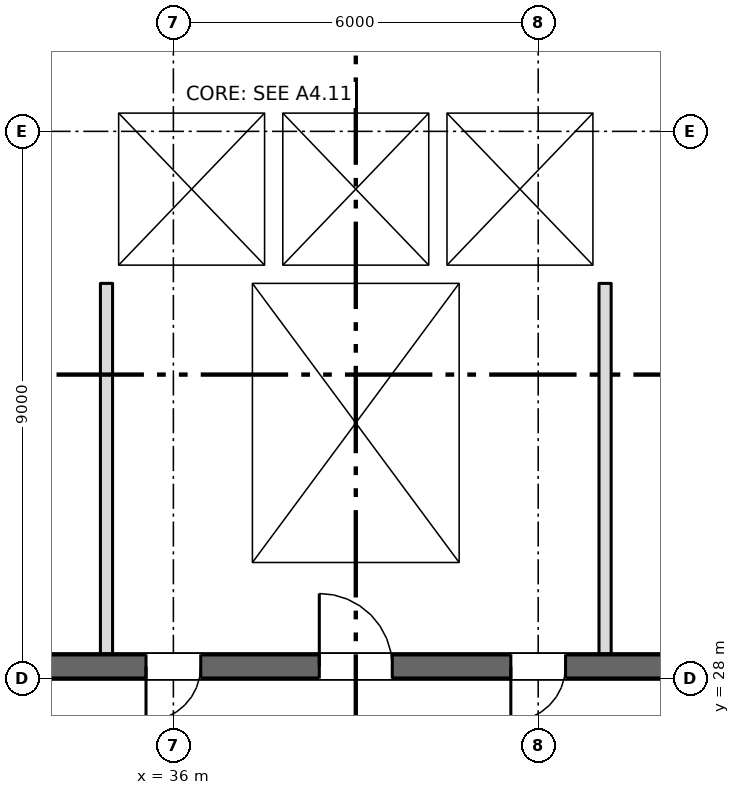
"""IFC4 building model, lengths in metres.
Left out: names, types, materials, properties, quantities, classifications, styles, units other than length and angle.
Written with IfcOpenShell. Run it as: python <this file> out.ifc"""

import sys

from ifc_helpers import new_model, si_unit, direction, frame, frame_2d, origin, place, context, subcontext, project, spatial, rectangle, extrude, element, fill, save


model = new_model("IFC4")
c1 = context("Model", 3, precision=1e-05, world=origin(), true_north=direction((0.0, 1.0)))
c2 = subcontext(c1, "Body", "Model", "MODEL_VIEW")
j1 = project(units=[si_unit("LENGTHUNIT", "METRE"), si_unit("PLANEANGLEUNIT", "RADIAN")], contexts=[c1])
p1 = place(None, origin())
s1 = spatial("IfcSite", under=j1, at=p1, CompositionType="ELEMENT")
p2 = place(p1, origin())
s2 = spatial("IfcBuilding", under=s1, at=p2, CompositionType="ELEMENT")
p3 = place(p2, frame((0.0, 0.0, 67.5)))
s3 = spatial("IfcBuildingStorey", under=s2, at=p3, CompositionType="ELEMENT", Elevation=67.5)
p4 = place(p3, frame((6.7, 28.2, 0.0), z_axis=(0.0, 0.0, 1.0), x_axis=(1.0, 0.0, 0.0)))
e1 = element("IfcWall", 1, at=p4, inside=s3, PredefinedType="SHEAR", context=c2, shape_type="SweptSolid", body=[
    extrude(rectangle(XDim=57.8, YDim=0.4, at=frame_2d((28.9, 0.0))), origin(), (0.0, 0.0, 1.0), 3.35),
])
p5 = place(p4, frame((12.562, 0.0, 0.0)))
e2 = element("IfcOpeningElement", 2, at=p5, cuts=e1, PredefinedType="OPENING", context=c2, shape_type="SweptSolid", body=[
    extrude(rectangle(XDim=0.9, YDim=2.1, at=frame_2d((0.45, 1.05))), frame((0.0, 0.21, 0.0), z_axis=(0.0, -1.0, 0.0), x_axis=(1.0, 0.0, 0.0)), (0.0, 0.0, 1.0), 0.42),
])
p6 = place(p4, frame((15.137, 0.0, 0.0)))
e3 = element("IfcOpeningElement", 3, at=p6, cuts=e1, PredefinedType="OPENING", context=c2, shape_type="SweptSolid", body=[
    extrude(rectangle(XDim=0.9, YDim=2.1, at=frame_2d((0.45, 1.05))), frame((0.0, 0.21, 0.0), z_axis=(0.0, -1.0, 0.0), x_axis=(1.0, 0.0, 0.0)), (0.0, 0.0, 1.0), 0.42),
])
p7 = place(p4, frame((49.85, 0.0, 0.0)))
e4 = element("IfcOpeningElement", 4, at=p7, cuts=e1, PredefinedType="OPENING", context=c2, shape_type="SweptSolid", body=[
    extrude(rectangle(XDim=0.9, YDim=2.1, at=frame_2d((0.45, 1.05))), frame((0.0, 0.21, 0.0), z_axis=(0.0, -1.0, 0.0), x_axis=(1.0, 0.0, 0.0)), (0.0, 0.0, 1.0), 0.42),
])
p8 = place(p4, frame((0.562, 0.0, 0.0)))
e5 = element("IfcOpeningElement", 5, at=p8, cuts=e1, PredefinedType="OPENING", context=c2, shape_type="SweptSolid", body=[
    extrude(rectangle(XDim=0.9, YDim=2.1, at=frame_2d((0.45, 1.05))), frame((0.0, 0.21, 0.0), z_axis=(0.0, -1.0, 0.0), x_axis=(1.0, 0.0, 0.0)), (0.0, 0.0, 1.0), 0.42),
])
p9 = place(p4, frame((2.137, 0.0, 0.0)))
e6 = element("IfcOpeningElement", 6, at=p9, cuts=e1, PredefinedType="OPENING", context=c2, shape_type="SweptSolid", body=[
    extrude(rectangle(XDim=0.9, YDim=2.1, at=frame_2d((0.45, 1.05))), frame((0.0, 0.21, 0.0), z_axis=(0.0, -1.0, 0.0), x_axis=(1.0, 0.0, 0.0)), (0.0, 0.0, 1.0), 0.42),
])
p10 = place(p4, frame((4.7, 0.0, 0.0)))
e7 = element("IfcOpeningElement", 7, at=p10, cuts=e1, PredefinedType="OPENING", context=c2, shape_type="SweptSolid", body=[
    extrude(rectangle(XDim=1.2, YDim=2.1, at=frame_2d((0.6, 1.05))), frame((0.0, 0.21, 0.0), z_axis=(0.0, -1.0, 0.0), x_axis=(1.0, 0.0, 0.0)), (0.0, 0.0, 1.0), 0.42),
])
p11 = place(p4, frame((31.7, 0.0, 0.0)))
e8 = element("IfcOpeningElement", 8, at=p11, cuts=e1, PredefinedType="OPENING", context=c2, shape_type="SweptSolid", body=[
    extrude(rectangle(XDim=1.2, YDim=2.1, at=frame_2d((0.6, 1.05))), frame((0.0, 0.21, 0.0), z_axis=(0.0, -1.0, 0.0), x_axis=(1.0, 0.0, 0.0)), (0.0, 0.0, 1.0), 0.42),
])
p12 = place(p4, frame((55.2, 0.0, 0.0)))
e9 = element("IfcOpeningElement", 9, at=p12, cuts=e1, PredefinedType="OPENING", context=c2, shape_type="SweptSolid", body=[
    extrude(rectangle(XDim=1.2, YDim=2.1, at=frame_2d((0.6, 1.05))), frame((0.0, 0.21, 0.0), z_axis=(0.0, -1.0, 0.0), x_axis=(1.0, 0.0, 0.0)), (0.0, 0.0, 1.0), 0.42),
])
p13 = place(p4, frame((21.7, 0.0, 0.0)))
e10 = element("IfcOpeningElement", 10, at=p13, cuts=e1, PredefinedType="OPENING", context=c2, shape_type="SweptSolid", body=[
    extrude(rectangle(XDim=1.2, YDim=2.1, at=frame_2d((0.6, 1.05))), frame((0.0, 0.21, 0.0), z_axis=(0.0, -1.0, 0.0), x_axis=(1.0, 0.0, 0.0)), (0.0, 0.0, 1.0), 0.42),
])
p14 = place(p4, frame((41.7, 0.0, 0.0)))
e11 = element("IfcOpeningElement", 11, at=p14, cuts=e1, PredefinedType="OPENING", context=c2, shape_type="SweptSolid", body=[
    extrude(rectangle(XDim=1.2, YDim=2.1, at=frame_2d((0.6, 1.05))), frame((0.0, 0.21, 0.0), z_axis=(0.0, -1.0, 0.0), x_axis=(1.0, 0.0, 0.0)), (0.0, 0.0, 1.0), 0.42),
])
p15 = place(p4, frame((24.85, 0.0, 0.0)))
e12 = element("IfcOpeningElement", 12, at=p15, cuts=e1, PredefinedType="OPENING", context=c2, shape_type="SweptSolid", body=[
    extrude(rectangle(XDim=2.4, YDim=2.1, at=frame_2d((1.2, 1.05))), frame((0.0, 0.21, 0.0), z_axis=(0.0, -1.0, 0.0), x_axis=(1.0, 0.0, 0.0)), (0.0, 0.0, 1.0), 0.42),
])
p16 = place(p4, frame((37.35, 0.0, 0.0)))
e13 = element("IfcOpeningElement", 13, at=p16, cuts=e1, PredefinedType="OPENING", context=c2, shape_type="SweptSolid", body=[
    extrude(rectangle(XDim=2.4, YDim=2.1, at=frame_2d((1.2, 1.05))), frame((0.0, 0.21, 0.0), z_axis=(0.0, -1.0, 0.0), x_axis=(1.0, 0.0, 0.0)), (0.0, 0.0, 1.0), 0.42),
])
p17 = place(p4, frame((7.85, 0.0, 0.0)))
e14 = element("IfcOpeningElement", 14, at=p17, cuts=e1, PredefinedType="OPENING", context=c2, shape_type="SweptSolid", body=[
    extrude(rectangle(XDim=2.4, YDim=2.1, at=frame_2d((1.2, 1.05))), frame((0.0, 0.21, 0.0), z_axis=(0.0, -1.0, 0.0), x_axis=(1.0, 0.0, 0.0)), (0.0, 0.0, 1.0), 0.42),
])
p18 = place(p4, frame((28.85, 0.0, 0.0)))
e15 = element("IfcOpeningElement", 15, at=p18, cuts=e1, PredefinedType="OPENING", context=c2, shape_type="SweptSolid", body=[
    extrude(rectangle(XDim=0.9, YDim=2.1, at=frame_2d((0.45, 1.05))), frame((0.0, 0.21, 0.0), z_axis=(0.0, -1.0, 0.0), x_axis=(1.0, 0.0, 0.0)), (0.0, 0.0, 1.0), 0.42),
])
p19 = place(p4, frame((34.85, 0.0, 0.0)))
e16 = element("IfcOpeningElement", 16, at=p19, cuts=e1, PredefinedType="OPENING", context=c2, shape_type="SweptSolid", body=[
    extrude(rectangle(XDim=0.9, YDim=2.1, at=frame_2d((0.45, 1.05))), frame((0.0, 0.21, 0.0), z_axis=(0.0, -1.0, 0.0), x_axis=(1.0, 0.0, 0.0)), (0.0, 0.0, 1.0), 0.42),
])
for number, where, z_axis, x_axis in (
    (17, (37.15, 28.4, 0.0), (0.0, 0.0, 1.0), (0.0, 1.0, 0.0)),
    (18, (40.85, 28.4, 0.0), (0.0, 0.0, 1.0), (0.0, 1.0, 0.0)),
):
    element("IfcWall", number, at=place(p3, frame(where, z_axis=z_axis, x_axis=x_axis)), inside=s3, PredefinedType="SHEAR", context=c2, shape_type="SweptSolid", body=[
        extrude(rectangle(XDim=6.1, YDim=0.3, at=frame_2d((3.05, 0.0))), origin(), (0.0, 0.0, 1.0), 3.35),
    ])
p20 = place(p3, frame((34.8, 34.65, 0.0), z_axis=(0.0, 0.0, 1.0), x_axis=(1.0, 0.0, 0.0)))
e19 = element("IfcWall", 19, at=p20, inside=s3, PredefinedType="SHEAR", context=c2, shape_type="SweptSolid", body=[
    extrude(rectangle(XDim=8.4, YDim=0.3, at=frame_2d((4.2, 0.0))), origin(), (0.0, 0.0, 1.0), 3.35),
])
p21 = place(p3, frame((34.8, 37.45, 0.0), z_axis=(0.0, 0.0, 1.0), x_axis=(1.0, 0.0, 0.0)))
e20 = element("IfcWall", 20, at=p21, inside=s3, PredefinedType="SHEAR", context=c2, shape_type="SweptSolid", body=[
    extrude(rectangle(XDim=8.4, YDim=0.3, at=frame_2d((4.2, 0.0))), origin(), (0.0, 0.0, 1.0), 3.35),
])
p22 = place(p21, frame((0.95, 0.0, 0.0)))
e21 = element("IfcOpeningElement", 21, at=p22, cuts=e20, PredefinedType="OPENING", context=c2, shape_type="SweptSolid", body=[
    extrude(rectangle(XDim=1.1, YDim=2.1, at=frame_2d((0.55, 1.05))), frame((0.0, 0.16, 0.0), z_axis=(0.0, -1.0, 0.0), x_axis=(1.0, 0.0, 0.0)), (0.0, 0.0, 1.0), 0.32),
])
p23 = place(p21, frame((3.65, 0.0, 0.0)))
e22 = element("IfcOpeningElement", 22, at=p23, cuts=e20, PredefinedType="OPENING", context=c2, shape_type="SweptSolid", body=[
    extrude(rectangle(XDim=1.1, YDim=2.1, at=frame_2d((0.55, 1.05))), frame((0.0, 0.16, 0.0), z_axis=(0.0, -1.0, 0.0), x_axis=(1.0, 0.0, 0.0)), (0.0, 0.0, 1.0), 0.32),
])
p24 = place(p21, frame((6.35, 0.0, 0.0)))
e23 = element("IfcOpeningElement", 23, at=p24, cuts=e20, PredefinedType="OPENING", context=c2, shape_type="SweptSolid", body=[
    extrude(rectangle(XDim=1.1, YDim=2.1, at=frame_2d((0.55, 1.05))), frame((0.0, 0.16, 0.0), z_axis=(0.0, -1.0, 0.0), x_axis=(1.0, 0.0, 0.0)), (0.0, 0.0, 1.0), 0.32),
])
for number, where, z_axis, x_axis in (
    (24, (34.95, 34.8, 0.0), (0.0, 0.0, 1.0), (0.0, 1.0, 0.0)),
    (25, (43.05, 34.8, 0.0), (0.0, 0.0, 1.0), (0.0, 1.0, 0.0)),
    (26, (37.65, 34.8, 0.0), (0.0, 0.0, 1.0), (0.0, 1.0, 0.0)),
    (27, (40.35, 34.8, 0.0), (0.0, 0.0, 1.0), (0.0, 1.0, 0.0)),
):
    element("IfcWall", number, at=place(p3, frame(where, z_axis=z_axis, x_axis=x_axis)), inside=s3, PredefinedType="SHEAR", context=c2, shape_type="SweptSolid", body=[
        extrude(rectangle(XDim=2.5, YDim=0.3, at=frame_2d((1.25, 0.0))), origin(), (0.0, 0.0, 1.0), 3.35),
    ])
for number, where, z_axis, x_axis in (
    (28, (34.9, 28.4, 0.0), (0.0, 0.0, 1.0), (0.0, 1.0, 0.0)),
    (29, (43.1, 28.4, 0.0), (0.0, 0.0, 1.0), (0.0, 1.0, 0.0)),
):
    element("IfcWall", number, at=place(p3, frame(where, z_axis=z_axis, x_axis=x_axis)), inside=s3, PredefinedType="PARTITIONING", context=c2, shape_type="SweptSolid", body=[
        extrude(rectangle(XDim=6.1, YDim=0.2, at=frame_2d((3.05, 0.0))), origin(), (0.0, 0.0, 1.0), 3.35),
    ])
p25 = place(p22, origin())
e30 = element("IfcDoor", 30, at=p25, inside=s3, OperationType="SLIDING_TO_LEFT", PredefinedType="DOOR", context=c2, shape_type="SweptSolid", body=[
    extrude(rectangle(XDim=1.1, YDim=2.1, at=frame_2d((0.55, 1.05))), frame((0.0, 0.025, 0.0), z_axis=(0.0, -1.0, 0.0), x_axis=(1.0, 0.0, 0.0)), (0.0, 0.0, 1.0), 0.05),
])
fill(e21, e30)
p26 = place(p23, origin())
e31 = element("IfcDoor", 31, at=p26, inside=s3, OperationType="SLIDING_TO_LEFT", PredefinedType="DOOR", context=c2, shape_type="SweptSolid", body=[
    extrude(rectangle(XDim=1.1, YDim=2.1, at=frame_2d((0.55, 1.05))), frame((0.0, 0.025, 0.0), z_axis=(0.0, -1.0, 0.0), x_axis=(1.0, 0.0, 0.0)), (0.0, 0.0, 1.0), 0.05),
])
fill(e22, e31)
p27 = place(p24, origin())
e32 = element("IfcDoor", 32, at=p27, inside=s3, OperationType="SLIDING_TO_LEFT", PredefinedType="DOOR", context=c2, shape_type="SweptSolid", body=[
    extrude(rectangle(XDim=1.1, YDim=2.1, at=frame_2d((0.55, 1.05))), frame((0.0, 0.025, 0.0), z_axis=(0.0, -1.0, 0.0), x_axis=(1.0, 0.0, 0.0)), (0.0, 0.0, 1.0), 0.05),
])
fill(e23, e32)
p28 = place(p11, origin())
e33 = element("IfcDoor", 33, at=p28, inside=s3, OperationType="SINGLE_SWING_LEFT", PredefinedType="DOOR", context=c2, shape_type="SweptSolid", body=[
    extrude(rectangle(XDim=1.2, YDim=2.1, at=frame_2d((0.6, 1.05))), frame((0.0, 0.025, 0.0), z_axis=(0.0, -1.0, 0.0), x_axis=(1.0, 0.0, 0.0)), (0.0, 0.0, 1.0), 0.05),
])
fill(e8, e33)
p29 = place(p18, origin())
e34 = element("IfcDoor", 34, at=p29, inside=s3, OperationType="SINGLE_SWING_LEFT", PredefinedType="DOOR", context=c2, shape_type="SweptSolid", body=[
    extrude(rectangle(XDim=0.9, YDim=2.1, at=frame_2d((0.45, 1.05))), frame((0.0, 0.025, 0.0), z_axis=(0.0, -1.0, 0.0), x_axis=(1.0, 0.0, 0.0)), (0.0, 0.0, 1.0), 0.05),
])
fill(e15, e34)
p30 = place(p19, origin())
e35 = element("IfcDoor", 35, at=p30, inside=s3, OperationType="SINGLE_SWING_LEFT", PredefinedType="DOOR", context=c2, shape_type="SweptSolid", body=[
    extrude(rectangle(XDim=0.9, YDim=2.1, at=frame_2d((0.45, 1.05))), frame((0.0, 0.025, 0.0), z_axis=(0.0, -1.0, 0.0), x_axis=(1.0, 0.0, 0.0)), (0.0, 0.0, 1.0), 0.05),
])
fill(e16, e35)
save(model, sys.argv[1])
